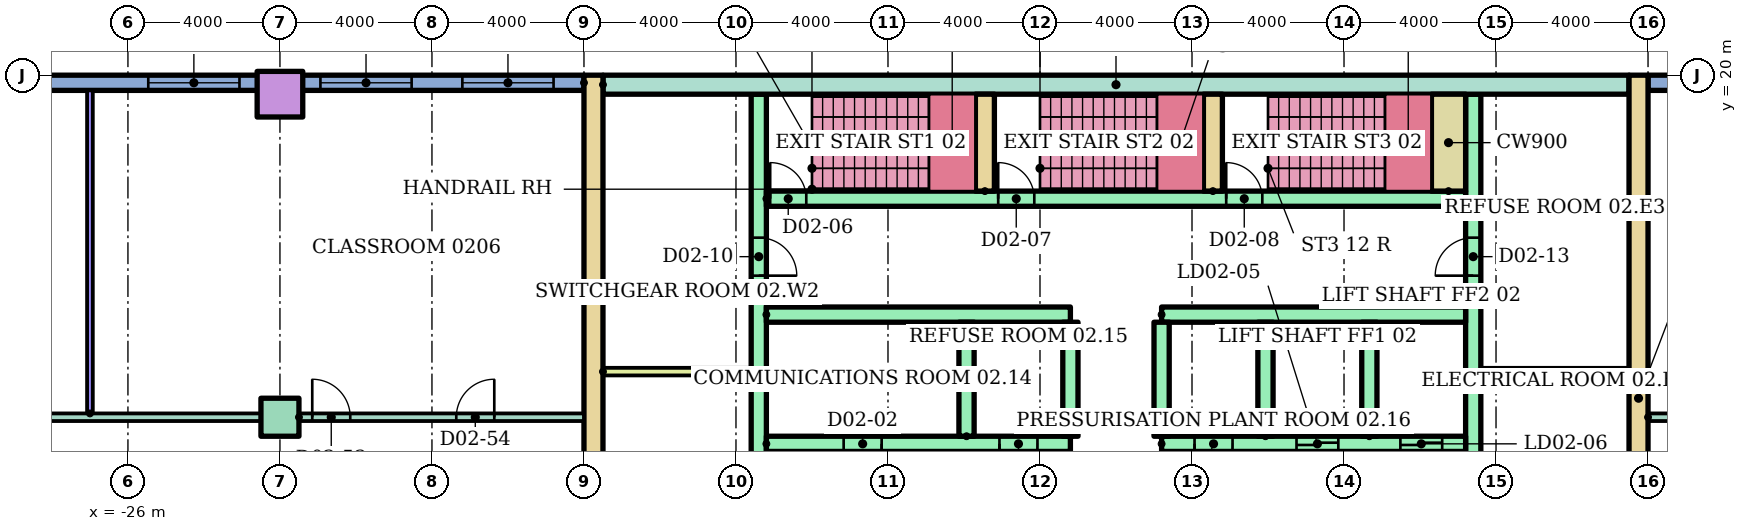
"""IFC4 building model, lengths in metres.
Left out: names, types, materials, properties, quantities, classifications, styles, units other than length and angle.
Written with IfcOpenShell. Run it as: python <this file> out.ifc"""

import sys

from ifc_helpers import new_model, si_unit, direction, frame, frame_2d, origin, origin_2d, place, context, subcontext, project, spatial, rectangle, hollow_rectangle, extrude, element, fill, save


model = new_model("IFC4")
c1 = context("Model", 3, precision=1e-05, world=origin(), true_north=direction((0.0, 1.0)))
c2 = subcontext(c1, "Body", "Model", "MODEL_VIEW")
j1 = project(units=[si_unit("LENGTHUNIT", "METRE"), si_unit("PLANEANGLEUNIT", "RADIAN")], contexts=[c1])
p1 = place(None, origin())
s1 = spatial("IfcSite", under=j1, at=p1, CompositionType="ELEMENT")
p2 = place(p1, origin())
s2 = spatial("IfcBuilding", under=s1, at=p2, CompositionType="ELEMENT")
p3 = place(p2, frame((0.0, 0.0, 10.0)))
s3 = spatial("IfcBuildingStorey", under=s2, at=p3, CompositionType="ELEMENT", Elevation=10.0)
p4 = place(p3, frame((-22.0, 11.0, 0.0)))
e1 = element("IfcColumn", 1, at=p4, inside=s3, PredefinedType="COLUMN", context=c2, shape_type="SweptSolid", body=[
    extrude(rectangle(XDim=1.0, YDim=1.0, at=origin_2d()), origin(), (0.0, 0.0, 1.0), 4.0),
])
p5 = place(p3, frame((-22.0, 19.5, 0.0)))
e2 = element("IfcColumn", 2, at=p5, inside=s3, PredefinedType="COLUMN", context=c2, shape_type="SweptSolid", body=[
    extrude(hollow_rectangle(XDim=1.2, YDim=1.2, WallThickness=0.06, at=origin_2d()), origin(), (0.0, 0.0, 1.0), 4.0),
])
p6 = place(p3, frame((39.6, 19.8, 0.0), z_axis=(0.0, 0.0, 1.0), x_axis=(-1.0, 0.0, 0.0)))
e3 = element("IfcWall", 3, at=p6, inside=s3, PredefinedType="STANDARD", context=c2, shape_type="SweptSolid", body=[
    extrude(rectangle(XDim=25.6, YDim=0.4, at=frame_2d((12.8, 0.0))), origin(), (0.0, 0.0, 1.0), 3.7),
])
p7 = place(p6, frame((2.4, 0.0, 0.9)))
e4 = element("IfcOpeningElement", 4, at=p7, cuts=e3, PredefinedType="OPENING", context=c2, shape_type="SweptSolid", body=[
    extrude(rectangle(XDim=2.4, YDim=2.1, at=frame_2d((1.2, 1.05))), frame((0.0, 0.21, 0.0), z_axis=(0.0, -1.0, 0.0), x_axis=(1.0, 0.0, 0.0)), (0.0, 0.0, 1.0), 0.42),
])
p8 = place(p6, frame((10.135, 0.0, 0.9)))
e5 = element("IfcOpeningElement", 5, at=p8, cuts=e3, PredefinedType="OPENING", context=c2, shape_type="SweptSolid", body=[
    extrude(rectangle(XDim=2.4, YDim=2.1, at=frame_2d((1.2, 1.05))), frame((0.0, 0.21, 0.0), z_axis=(0.0, -1.0, 0.0), x_axis=(1.0, 0.0, 0.0)), (0.0, 0.0, 1.0), 0.42),
])
p9 = place(p6, frame((14.665, 0.0, 0.9)))
e6 = element("IfcOpeningElement", 6, at=p9, cuts=e3, PredefinedType="OPENING", context=c2, shape_type="SweptSolid", body=[
    extrude(rectangle(XDim=2.4, YDim=2.1, at=frame_2d((1.2, 1.05))), frame((0.0, 0.21, 0.0), z_axis=(0.0, -1.0, 0.0), x_axis=(1.0, 0.0, 0.0)), (0.0, 0.0, 1.0), 0.42),
])
p10 = place(p6, frame((18.135, 0.0, 0.9)))
e7 = element("IfcOpeningElement", 7, at=p10, cuts=e3, PredefinedType="OPENING", context=c2, shape_type="SweptSolid", body=[
    extrude(rectangle(XDim=2.4, YDim=2.1, at=frame_2d((1.2, 1.05))), frame((0.0, 0.21, 0.0), z_axis=(0.0, -1.0, 0.0), x_axis=(1.0, 0.0, 0.0)), (0.0, 0.0, 1.0), 0.42),
])
p11 = place(p6, frame((22.665, 0.0, 0.9)))
e8 = element("IfcOpeningElement", 8, at=p11, cuts=e3, PredefinedType="OPENING", context=c2, shape_type="SweptSolid", body=[
    extrude(rectangle(XDim=2.4, YDim=2.1, at=frame_2d((1.2, 1.05))), frame((0.0, 0.21, 0.0), z_axis=(0.0, -1.0, 0.0), x_axis=(1.0, 0.0, 0.0)), (0.0, 0.0, 1.0), 0.42),
])
p12 = place(p3, frame((-14.0, 19.8, 0.0), z_axis=(0.0, 0.0, 1.0), x_axis=(-1.0, 0.0, 0.0)))
e9 = element("IfcWall", 9, at=p12, inside=s3, PredefinedType="STANDARD", context=c2, shape_type="SweptSolid", body=[
    extrude(rectangle(XDim=25.6, YDim=0.4, at=frame_2d((12.8, 0.0))), origin(), (0.0, 0.0, 1.0), 3.7),
])
p13 = place(p12, frame((0.8, 0.0, 0.9)))
e10 = element("IfcOpeningElement", 10, at=p13, cuts=e9, PredefinedType="OPENING", context=c2, shape_type="SweptSolid", body=[
    extrude(rectangle(XDim=2.4, YDim=2.1, at=frame_2d((1.2, 1.05))), frame((0.0, 0.21, 0.0), z_axis=(0.0, -1.0, 0.0), x_axis=(1.0, 0.0, 0.0)), (0.0, 0.0, 1.0), 0.42),
])
p14 = place(p12, frame((4.535, 0.0, 0.9)))
e11 = element("IfcOpeningElement", 11, at=p14, cuts=e9, PredefinedType="OPENING", context=c2, shape_type="SweptSolid", body=[
    extrude(rectangle(XDim=2.4, YDim=2.1, at=frame_2d((1.2, 1.05))), frame((0.0, 0.21, 0.0), z_axis=(0.0, -1.0, 0.0), x_axis=(1.0, 0.0, 0.0)), (0.0, 0.0, 1.0), 0.42),
])
p15 = place(p12, frame((9.065, 0.0, 0.9)))
e12 = element("IfcOpeningElement", 12, at=p15, cuts=e9, PredefinedType="OPENING", context=c2, shape_type="SweptSolid", body=[
    extrude(rectangle(XDim=2.4, YDim=2.1, at=frame_2d((1.2, 1.05))), frame((0.0, 0.21, 0.0), z_axis=(0.0, -1.0, 0.0), x_axis=(1.0, 0.0, 0.0)), (0.0, 0.0, 1.0), 0.42),
])
p16 = place(p12, frame((20.8, 0.0, 0.9)))
e13 = element("IfcOpeningElement", 13, at=p16, cuts=e9, PredefinedType="OPENING", context=c2, shape_type="SweptSolid", body=[
    extrude(rectangle(XDim=2.4, YDim=2.1, at=frame_2d((1.2, 1.05))), frame((0.0, 0.21, 0.0), z_axis=(0.0, -1.0, 0.0), x_axis=(1.0, 0.0, 0.0)), (0.0, 0.0, 1.0), 0.42),
])
for number, where, z_axis, x_axis in (
    (14, (-13.75, 3.0, 0.0), (0.0, 0.0, 1.0), (0.0, 1.0, 0.0)),
    (15, (13.75, 3.0, 0.0), (0.0, 0.0, 1.0), (0.0, 1.0, 0.0)),
):
    element("IfcWall", number, at=place(p3, frame(where, z_axis=z_axis, x_axis=x_axis)), inside=s3, PredefinedType="SHEAR", context=c2, shape_type="SweptSolid", body=[
        extrude(rectangle(XDim=17.0, YDim=0.5, at=frame_2d((8.5, 0.0))), origin(), (0.0, 0.0, 1.0), 3.7),
    ])
p17 = place(p3, frame((-13.5, 19.75, 0.0)))
e16 = element("IfcWall", 16, at=p17, inside=s3, PredefinedType="SHEAR", context=c2, shape_type="SweptSolid", body=[
    extrude(rectangle(XDim=27.0, YDim=0.5, at=frame_2d((13.5, 0.0))), origin(), (0.0, 0.0, 1.0), 3.7),
])
p18 = place(p3, frame((-9.4, 6.8, 0.0), z_axis=(0.0, 0.0, 1.0), x_axis=(0.0, 1.0, 0.0)))
e17 = element("IfcWall", 17, at=p18, inside=s3, PredefinedType="SHEAR", context=c2, shape_type="SweptSolid", body=[
    extrude(rectangle(XDim=12.7, YDim=0.4, at=frame_2d((6.35, 0.0))), origin(), (0.0, 0.0, 1.0), 3.7),
])
p19 = place(p18, frame((1.15, 0.0, 0.0)))
e18 = element("IfcOpeningElement", 18, at=p19, cuts=e17, PredefinedType="OPENING", context=c2, shape_type="SweptSolid", body=[
    extrude(rectangle(XDim=1.0, YDim=2.1, at=frame_2d((0.5, 1.05))), frame((0.0, 0.21, 0.0), z_axis=(0.0, -1.0, 0.0), x_axis=(1.0, 0.0, 0.0)), (0.0, 0.0, 1.0), 0.42),
])
p20 = place(p18, frame((7.925, 0.0, 0.0)))
e19 = element("IfcOpeningElement", 19, at=p20, cuts=e17, PredefinedType="OPENING", context=c2, shape_type="SweptSolid", body=[
    extrude(rectangle(XDim=1.0, YDim=2.1, at=frame_2d((0.5, 1.05))), frame((0.0, 0.21, 0.0), z_axis=(0.0, -1.0, 0.0), x_axis=(1.0, 0.0, 0.0)), (0.0, 0.0, 1.0), 0.42),
])
p21 = place(p3, frame((9.4, 6.8, 0.0), z_axis=(0.0, 0.0, 1.0), x_axis=(0.0, 1.0, 0.0)))
e20 = element("IfcWall", 20, at=p21, inside=s3, PredefinedType="SHEAR", context=c2, shape_type="SweptSolid", body=[
    extrude(rectangle(XDim=12.7, YDim=0.4, at=frame_2d((6.35, 0.0))), origin(), (0.0, 0.0, 1.0), 3.7),
])
p22 = place(p21, frame((0.3, 0.0, 0.0)))
e21 = element("IfcOpeningElement", 21, at=p22, cuts=e20, PredefinedType="OPENING", context=c2, shape_type="SweptSolid", body=[
    extrude(rectangle(XDim=1.0, YDim=2.1, at=frame_2d((0.5, 1.05))), frame((0.0, 0.21, 0.0), z_axis=(0.0, -1.0, 0.0), x_axis=(1.0, 0.0, 0.0)), (0.0, 0.0, 1.0), 0.42),
])
p23 = place(p21, frame((2.05, 0.0, 0.0)))
e22 = element("IfcOpeningElement", 22, at=p23, cuts=e20, PredefinedType="OPENING", context=c2, shape_type="SweptSolid", body=[
    extrude(rectangle(XDim=1.0, YDim=2.1, at=frame_2d((0.5, 1.05))), frame((0.0, 0.21, 0.0), z_axis=(0.0, -1.0, 0.0), x_axis=(1.0, 0.0, 0.0)), (0.0, 0.0, 1.0), 0.42),
])
p24 = place(p21, frame((7.925, 0.0, 0.0)))
e23 = element("IfcOpeningElement", 23, at=p24, cuts=e20, PredefinedType="OPENING", context=c2, shape_type="SweptSolid", body=[
    extrude(rectangle(XDim=1.0, YDim=2.1, at=frame_2d((0.5, 1.05))), frame((0.0, 0.21, 0.0), z_axis=(0.0, -1.0, 0.0), x_axis=(1.0, 0.0, 0.0)), (0.0, 0.0, 1.0), 0.42),
])
p25 = place(p3, frame((-9.2, 10.3, 0.0)))
e24 = element("IfcWall", 24, at=p25, inside=s3, PredefinedType="SHEAR", context=c2, shape_type="SweptSolid", body=[
    extrude(rectangle(XDim=8.0, YDim=0.4, at=frame_2d((4.0, 0.0))), origin(), (0.0, 0.0, 1.0), 3.7),
])
p26 = place(p25, frame((2.033, 0.0, 0.0)))
e25 = element("IfcOpeningElement", 25, at=p26, cuts=e24, PredefinedType="OPENING", context=c2, shape_type="SweptSolid", body=[
    extrude(rectangle(XDim=1.0, YDim=2.1, at=frame_2d((0.5, 1.05))), frame((0.0, 0.21, 0.0), z_axis=(0.0, -1.0, 0.0), x_axis=(1.0, 0.0, 0.0)), (0.0, 0.0, 1.0), 0.42),
])
p27 = place(p25, frame((6.133, 0.0, 0.0)))
e26 = element("IfcOpeningElement", 26, at=p27, cuts=e24, PredefinedType="OPENING", context=c2, shape_type="SweptSolid", body=[
    extrude(rectangle(XDim=1.0, YDim=2.1, at=frame_2d((0.5, 1.05))), frame((0.0, 0.21, 0.0), z_axis=(0.0, -1.0, 0.0), x_axis=(1.0, 0.0, 0.0)), (0.0, 0.0, 1.0), 0.42),
])
p28 = place(p3, frame((-9.2, 13.7, 0.0)))
e27 = element("IfcWall", 27, at=p28, inside=s3, PredefinedType="SHEAR", context=c2, shape_type="SweptSolid", body=[
    extrude(rectangle(XDim=8.0, YDim=0.4, at=frame_2d((4.0, 0.0))), origin(), (0.0, 0.0, 1.0), 3.7),
])
p29 = place(p3, frame((1.2, 10.3, 0.0)))
e28 = element("IfcWall", 28, at=p29, inside=s3, PredefinedType="SHEAR", context=c2, shape_type="SweptSolid", body=[
    extrude(rectangle(XDim=8.0, YDim=0.4, at=frame_2d((4.0, 0.0))), origin(), (0.0, 0.0, 1.0), 3.7),
])
p30 = place(p29, frame((3.55, 0.0, 0.0)))
e29 = element("IfcOpeningElement", 29, at=p30, cuts=e28, PredefinedType="OPENING", context=c2, shape_type="SweptSolid", body=[
    extrude(rectangle(XDim=1.1, YDim=2.1, at=frame_2d((0.55, 1.05))), frame((0.0, 0.21, 0.0), z_axis=(0.0, -1.0, 0.0), x_axis=(1.0, 0.0, 0.0)), (0.0, 0.0, 1.0), 0.42),
])
p31 = place(p29, frame((6.283, 0.0, 0.0)))
e30 = element("IfcOpeningElement", 30, at=p31, cuts=e28, PredefinedType="OPENING", context=c2, shape_type="SweptSolid", body=[
    extrude(rectangle(XDim=1.1, YDim=2.1, at=frame_2d((0.55, 1.05))), frame((0.0, 0.21, 0.0), z_axis=(0.0, -1.0, 0.0), x_axis=(1.0, 0.0, 0.0)), (0.0, 0.0, 1.0), 0.42),
])
p32 = place(p29, frame((0.867, 0.0, 0.0)))
e31 = element("IfcOpeningElement", 31, at=p32, cuts=e28, PredefinedType="OPENING", context=c2, shape_type="SweptSolid", body=[
    extrude(rectangle(XDim=1.0, YDim=2.1, at=frame_2d((0.5, 1.05))), frame((0.0, 0.21, 0.0), z_axis=(0.0, -1.0, 0.0), x_axis=(1.0, 0.0, 0.0)), (0.0, 0.0, 1.0), 0.42),
])
p33 = place(p3, frame((1.2, 13.7, 0.0)))
e32 = element("IfcWall", 32, at=p33, inside=s3, PredefinedType="SHEAR", context=c2, shape_type="SweptSolid", body=[
    extrude(rectangle(XDim=8.0, YDim=0.4, at=frame_2d((4.0, 0.0))), origin(), (0.0, 0.0, 1.0), 3.7),
])
for number, where, z_axis, x_axis in (
    (33, (-3.933, 10.5, 0.0), (0.0, 0.0, 1.0), (0.0, 1.0, 0.0)),
    (34, (-1.2, 10.5, 0.0), (0.0, 0.0, 1.0), (0.0, 1.0, 0.0)),
    (35, (1.2, 10.5, 0.0), (0.0, 0.0, 1.0), (0.0, 1.0, 0.0)),
    (36, (3.933, 10.5, 0.0), (0.0, 0.0, 1.0), (0.0, 1.0, 0.0)),
    (37, (6.667, 10.5, 0.0), (0.0, 0.0, 1.0), (0.0, 1.0, 0.0)),
):
    element("IfcWall", number, at=place(p3, frame(where, z_axis=z_axis, x_axis=x_axis)), inside=s3, PredefinedType="SHEAR", context=c2, shape_type="SweptSolid", body=[
        extrude(rectangle(XDim=3.0, YDim=0.4, at=frame_2d((1.5, 0.0))), origin(), (0.0, 0.0, 1.0), 3.7),
    ])
p34 = place(p3, frame((-9.2, 16.75, 0.0)))
e38 = element("IfcWall", 38, at=p34, inside=s3, PredefinedType="SHEAR", context=c2, shape_type="SweptSolid", body=[
    extrude(rectangle(XDim=18.4, YDim=0.4, at=frame_2d((9.2, 0.0))), origin(), (0.0, 0.0, 1.0), 3.7),
])
p35 = place(p34, frame((0.1, 0.0, 0.0)))
e39 = element("IfcOpeningElement", 39, at=p35, cuts=e38, PredefinedType="OPENING", context=c2, shape_type="SweptSolid", body=[
    extrude(rectangle(XDim=0.95, YDim=2.1, at=frame_2d((0.475, 1.05))), frame((0.0, 0.21, 0.0), z_axis=(0.0, -1.0, 0.0), x_axis=(1.0, 0.0, 0.0)), (0.0, 0.0, 1.0), 0.42),
])
p36 = place(p34, frame((6.1, 0.0, 0.0)))
e40 = element("IfcOpeningElement", 40, at=p36, cuts=e38, PredefinedType="OPENING", context=c2, shape_type="SweptSolid", body=[
    extrude(rectangle(XDim=0.95, YDim=2.1, at=frame_2d((0.475, 1.05))), frame((0.0, 0.21, 0.0), z_axis=(0.0, -1.0, 0.0), x_axis=(1.0, 0.0, 0.0)), (0.0, 0.0, 1.0), 0.42),
])
p37 = place(p34, frame((12.1, 0.0, 0.0)))
e41 = element("IfcOpeningElement", 41, at=p37, cuts=e38, PredefinedType="OPENING", context=c2, shape_type="SweptSolid", body=[
    extrude(rectangle(XDim=0.95, YDim=2.1, at=frame_2d((0.475, 1.05))), frame((0.0, 0.21, 0.0), z_axis=(0.0, -1.0, 0.0), x_axis=(1.0, 0.0, 0.0)), (0.0, 0.0, 1.0), 0.42),
])
for number, where, z_axis, x_axis in (
    (42, (-3.45, 16.95, 0.0), (0.0, 0.0, 1.0), (0.0, 1.0, 0.0)),
    (43, (2.55, 16.95, 0.0), (0.0, 0.0, 1.0), (0.0, 1.0, 0.0)),
):
    element("IfcWall", number, at=place(p3, frame(where, z_axis=z_axis, x_axis=x_axis)), inside=s3, PredefinedType="SHEAR", context=c2, shape_type="SweptSolid", body=[
        extrude(rectangle(XDim=2.55, YDim=0.5, at=frame_2d((1.275, 0.0))), origin(), (0.0, 0.0, 1.0), 3.7),
    ])
p38 = place(p3, frame((8.75, 16.95, 0.0), z_axis=(0.0, 0.0, 1.0), x_axis=(0.0, 1.0, 0.0)))
e44 = element("IfcWall", 44, at=p38, inside=s3, PredefinedType="SHEAR", context=c2, shape_type="SweptSolid", body=[
    extrude(rectangle(XDim=2.55, YDim=0.9, at=frame_2d((1.275, 0.0))), origin(), (0.0, 0.0, 1.0), 3.7),
])
for number, where in (
    (45, (-13.5, 12.2, 0.0)),
    (46, (9.6, 12.2, 0.0)),
):
    element("IfcWall", number, at=place(p3, frame(where)), inside=s3, PredefinedType="PARTITIONING", context=c2, shape_type="SweptSolid", body=[
        extrude(rectangle(XDim=3.9, YDim=0.2, at=frame_2d((1.95, 0.0))), origin(), (0.0, 0.0, 1.0), 3.7),
    ])
p39 = place(p3, frame((-29.5, 11.0, 0.0)))
e47 = element("IfcWall", 47, at=p39, inside=s3, PredefinedType="PARTITIONING", context=c2, shape_type="SweptSolid", body=[
    extrude(rectangle(XDim=7.0, YDim=0.2, at=frame_2d((3.5, 0.0))), origin(), (0.0, 0.0, 1.0), 3.7),
])
p40 = place(p3, frame((-21.5, 11.0, 0.0)))
e48 = element("IfcWall", 48, at=p40, inside=s3, PredefinedType="PARTITIONING", context=c2, shape_type="SweptSolid", body=[
    extrude(rectangle(XDim=7.5, YDim=0.2, at=frame_2d((3.75, 0.0))), origin(), (0.0, 0.0, 1.0), 3.7),
])
p41 = place(p40, frame((0.35, 0.0, 0.0)))
e49 = element("IfcOpeningElement", 49, at=p41, cuts=e48, PredefinedType="OPENING", context=c2, shape_type="SweptSolid", body=[
    extrude(rectangle(XDim=1.0, YDim=2.1, at=frame_2d((0.5, 1.05))), frame((0.0, 0.11, 0.0), z_axis=(0.0, -1.0, 0.0), x_axis=(1.0, 0.0, 0.0)), (0.0, 0.0, 1.0), 0.22),
])
p42 = place(p40, frame((4.14, 0.0, 0.0)))
e50 = element("IfcOpeningElement", 50, at=p42, cuts=e48, PredefinedType="OPENING", context=c2, shape_type="SweptSolid", body=[
    extrude(rectangle(XDim=1.0, YDim=2.1, at=frame_2d((0.5, 1.05))), frame((0.0, 0.11, 0.0), z_axis=(0.0, -1.0, 0.0), x_axis=(1.0, 0.0, 0.0)), (0.0, 0.0, 1.0), 0.22),
])
p43 = place(p3, frame((14.0, 11.0, 0.0)))
e51 = element("IfcWall", 51, at=p43, inside=s3, PredefinedType="PARTITIONING", context=c2, shape_type="SweptSolid", body=[
    extrude(rectangle(XDim=3.5, YDim=0.2, at=frame_2d((1.75, 0.0))), origin(), (0.0, 0.0, 1.0), 3.7),
])
p44 = place(p3, frame((-27.0, 11.1, 0.0), z_axis=(0.0, 0.0, 1.0), x_axis=(0.0, 1.0, 0.0)))
e52 = element("IfcWall", 52, at=p44, inside=s3, PredefinedType="PARTITIONING", context=c2, shape_type="SweptSolid", body=[
    extrude(rectangle(XDim=8.5, YDim=0.15, at=frame_2d((4.25, 0.0))), origin(), (0.0, 0.0, 1.0), 3.7),
])
p45 = place(p13, origin())
e53 = element("IfcWindow", 53, at=p45, inside=s3, PartitioningType="SINGLE_PANEL", PredefinedType="WINDOW", context=c2, shape_type="SweptSolid", body=[
    extrude(rectangle(XDim=2.4, YDim=2.1, at=frame_2d((1.2, 1.05))), frame((0.0, 0.03, 0.0), z_axis=(0.0, -1.0, 0.0), x_axis=(1.0, 0.0, 0.0)), (0.0, 0.0, 1.0), 0.06),
])
fill(e10, e53)
p46 = place(p14, origin())
e54 = element("IfcWindow", 54, at=p46, inside=s3, PartitioningType="SINGLE_PANEL", PredefinedType="WINDOW", context=c2, shape_type="SweptSolid", body=[
    extrude(rectangle(XDim=2.4, YDim=2.1, at=frame_2d((1.2, 1.05))), frame((0.0, 0.03, 0.0), z_axis=(0.0, -1.0, 0.0), x_axis=(1.0, 0.0, 0.0)), (0.0, 0.0, 1.0), 0.06),
])
fill(e11, e54)
p47 = place(p15, origin())
e55 = element("IfcWindow", 55, at=p47, inside=s3, PartitioningType="SINGLE_PANEL", PredefinedType="WINDOW", context=c2, shape_type="SweptSolid", body=[
    extrude(rectangle(XDim=2.4, YDim=2.1, at=frame_2d((1.2, 1.05))), frame((0.0, 0.03, 0.0), z_axis=(0.0, -1.0, 0.0), x_axis=(1.0, 0.0, 0.0)), (0.0, 0.0, 1.0), 0.06),
])
fill(e12, e55)
p48 = place(p30, origin())
e56 = element("IfcDoor", 56, at=p48, inside=s3, OperationType="SLIDING_TO_LEFT", PredefinedType="DOOR", context=c2, shape_type="SweptSolid", body=[
    extrude(rectangle(XDim=1.1, YDim=2.1, at=frame_2d((0.55, 1.05))), frame((0.0, 0.025, 0.0), z_axis=(0.0, -1.0, 0.0), x_axis=(1.0, 0.0, 0.0)), (0.0, 0.0, 1.0), 0.05),
])
fill(e29, e56)
p49 = place(p31, origin())
e57 = element("IfcDoor", 57, at=p49, inside=s3, OperationType="SLIDING_TO_LEFT", PredefinedType="DOOR", context=c2, shape_type="SweptSolid", body=[
    extrude(rectangle(XDim=1.1, YDim=2.1, at=frame_2d((0.55, 1.05))), frame((0.0, 0.025, 0.0), z_axis=(0.0, -1.0, 0.0), x_axis=(1.0, 0.0, 0.0)), (0.0, 0.0, 1.0), 0.05),
])
fill(e30, e57)
p50 = place(p26, frame((1.0, 0.0, 0.0), z_axis=(0.0, 0.0, 1.0), x_axis=(-1.0, 0.0, 0.0)))
e58 = element("IfcDoor", 58, at=p50, inside=s3, OperationType="SINGLE_SWING_RIGHT", PredefinedType="DOOR", context=c2, shape_type="SweptSolid", body=[
    extrude(rectangle(XDim=1.0, YDim=2.1, at=frame_2d((0.5, 1.05))), frame((0.0, 0.025, 0.0), z_axis=(0.0, -1.0, 0.0), x_axis=(1.0, 0.0, 0.0)), (0.0, 0.0, 1.0), 0.05),
])
fill(e25, e58)
p51 = place(p27, frame((1.0, 0.0, 0.0), z_axis=(0.0, 0.0, 1.0), x_axis=(-1.0, 0.0, 0.0)))
e59 = element("IfcDoor", 59, at=p51, inside=s3, OperationType="SINGLE_SWING_LEFT", PredefinedType="DOOR", context=c2, shape_type="SweptSolid", body=[
    extrude(rectangle(XDim=1.0, YDim=2.1, at=frame_2d((0.5, 1.05))), frame((0.0, 0.025, 0.0), z_axis=(0.0, -1.0, 0.0), x_axis=(1.0, 0.0, 0.0)), (0.0, 0.0, 1.0), 0.05),
])
fill(e26, e59)
p52 = place(p32, frame((1.0, 0.0, 0.0), z_axis=(0.0, 0.0, 1.0), x_axis=(-1.0, 0.0, 0.0)))
e60 = element("IfcDoor", 60, at=p52, inside=s3, OperationType="SINGLE_SWING_LEFT", PredefinedType="DOOR", context=c2, shape_type="SweptSolid", body=[
    extrude(rectangle(XDim=1.0, YDim=2.1, at=frame_2d((0.5, 1.05))), frame((0.0, 0.025, 0.0), z_axis=(0.0, -1.0, 0.0), x_axis=(1.0, 0.0, 0.0)), (0.0, 0.0, 1.0), 0.05),
])
fill(e31, e60)
p53 = place(p35, origin())
e61 = element("IfcDoor", 61, at=p53, inside=s3, OperationType="SINGLE_SWING_LEFT", PredefinedType="DOOR", context=c2, shape_type="SweptSolid", body=[
    extrude(rectangle(XDim=0.95, YDim=2.1, at=frame_2d((0.475, 1.05))), frame((0.0, 0.025, 0.0), z_axis=(0.0, -1.0, 0.0), x_axis=(1.0, 0.0, 0.0)), (0.0, 0.0, 1.0), 0.05),
])
fill(e39, e61)
p54 = place(p36, origin())
e62 = element("IfcDoor", 62, at=p54, inside=s3, OperationType="SINGLE_SWING_LEFT", PredefinedType="DOOR", context=c2, shape_type="SweptSolid", body=[
    extrude(rectangle(XDim=0.95, YDim=2.1, at=frame_2d((0.475, 1.05))), frame((0.0, 0.025, 0.0), z_axis=(0.0, -1.0, 0.0), x_axis=(1.0, 0.0, 0.0)), (0.0, 0.0, 1.0), 0.05),
])
fill(e40, e62)
p55 = place(p37, origin())
e63 = element("IfcDoor", 63, at=p55, inside=s3, OperationType="SINGLE_SWING_LEFT", PredefinedType="DOOR", context=c2, shape_type="SweptSolid", body=[
    extrude(rectangle(XDim=0.95, YDim=2.1, at=frame_2d((0.475, 1.05))), frame((0.0, 0.025, 0.0), z_axis=(0.0, -1.0, 0.0), x_axis=(1.0, 0.0, 0.0)), (0.0, 0.0, 1.0), 0.05),
])
fill(e41, e63)
p56 = place(p20, frame((1.0, 0.0, 0.0), z_axis=(0.0, 0.0, 1.0), x_axis=(-1.0, 0.0, 0.0)))
e64 = element("IfcDoor", 64, at=p56, inside=s3, OperationType="SINGLE_SWING_LEFT", PredefinedType="DOOR", context=c2, shape_type="SweptSolid", body=[
    extrude(rectangle(XDim=1.0, YDim=2.1, at=frame_2d((0.5, 1.05))), frame((0.0, 0.025, 0.0), z_axis=(0.0, -1.0, 0.0), x_axis=(1.0, 0.0, 0.0)), (0.0, 0.0, 1.0), 0.05),
])
fill(e19, e64)
p57 = place(p24, origin())
e65 = element("IfcDoor", 65, at=p57, inside=s3, OperationType="SINGLE_SWING_LEFT", PredefinedType="DOOR", context=c2, shape_type="SweptSolid", body=[
    extrude(rectangle(XDim=1.0, YDim=2.1, at=frame_2d((0.5, 1.05))), frame((0.0, 0.025, 0.0), z_axis=(0.0, -1.0, 0.0), x_axis=(1.0, 0.0, 0.0)), (0.0, 0.0, 1.0), 0.05),
])
fill(e23, e65)
p58 = place(p41, origin())
e66 = element("IfcDoor", 66, at=p58, inside=s3, OperationType="SINGLE_SWING_LEFT", PredefinedType="DOOR", context=c2, shape_type="SweptSolid", body=[
    extrude(rectangle(XDim=1.0, YDim=2.1, at=frame_2d((0.5, 1.05))), frame((0.0, 0.025, 0.0), z_axis=(0.0, -1.0, 0.0), x_axis=(1.0, 0.0, 0.0)), (0.0, 0.0, 1.0), 0.05),
])
fill(e49, e66)
p59 = place(p42, origin())
e67 = element("IfcDoor", 67, at=p59, inside=s3, OperationType="SINGLE_SWING_RIGHT", PredefinedType="DOOR", context=c2, shape_type="SweptSolid", body=[
    extrude(rectangle(XDim=1.0, YDim=2.1, at=frame_2d((0.5, 1.05))), frame((0.0, 0.025, 0.0), z_axis=(0.0, -1.0, 0.0), x_axis=(1.0, 0.0, 0.0)), (0.0, 0.0, 1.0), 0.05),
])
fill(e50, e67)
save(model, sys.argv[1])
